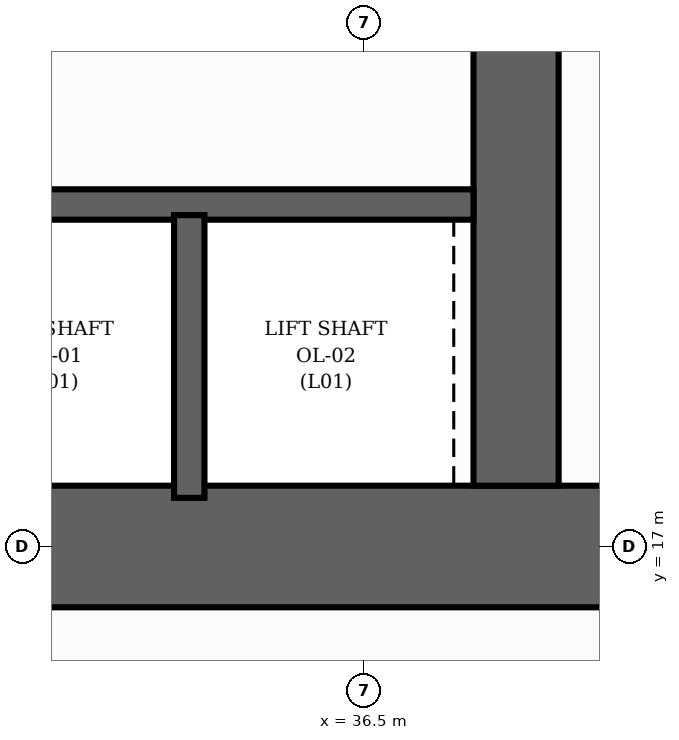
"""IFC4 building model, lengths in metres.
Left out: names, types, materials, properties, quantities, classifications, styles, units other than length and angle.
Written with IfcOpenShell. Run it as: python <this file> out.ifc"""

import sys

from ifc_helpers import new_model, si_unit, direction, frame, frame_2d, origin, place, context, subcontext, project, spatial, rectangle, extrude, element, save


model = new_model("IFC4")
c1 = context("Model", 3, precision=1e-05, world=origin(), true_north=direction((0.0, 1.0)))
c2 = subcontext(c1, "Body", "Model", "MODEL_VIEW")
j1 = project(units=[si_unit("LENGTHUNIT", "METRE"), si_unit("PLANEANGLEUNIT", "RADIAN")], contexts=[c1])
p1 = place(None, origin())
s1 = spatial("IfcSite", under=j1, at=p1, CompositionType="ELEMENT")
p2 = place(p1, origin())
s2 = spatial("IfcBuilding", under=s1, at=p2, CompositionType="ELEMENT")
p3 = place(p2, frame((0.0, 0.0, 4.0)))
s3 = spatial("IfcBuildingStorey", under=s2, at=p3, CompositionType="ELEMENT", Elevation=4.0)
p4 = place(p3, frame((22.6, 17.0, 0.0), z_axis=(0.0, 0.0, 1.0), x_axis=(1.0, 0.0, 0.0)))
e1 = element("IfcWall", 1, at=p4, inside=s3, PredefinedType="SHEAR", context=c2, shape_type="SweptSolid", body=[
    extrude(rectangle(XDim=18.8, YDim=0.8, at=frame_2d((9.4, 0.0))), origin(), (0.0, 0.0, 1.0), 4.0),
])
p5 = place(p4, frame((5.9, 0.0, 0.0)))
e2 = element("IfcOpeningElement", 2, at=p5, cuts=e1, PredefinedType="OPENING", context=c2, shape_type="SweptSolid", body=[
    extrude(rectangle(XDim=1.1, YDim=2.15, at=frame_2d((0.55, 1.075))), frame((0.0, 0.41, 0.0), z_axis=(0.0, -1.0, 0.0), x_axis=(1.0, 0.0, 0.0)), (0.0, 0.0, 1.0), 0.82),
])
p6 = place(p4, frame((9.45, 0.0, 0.0)))
e3 = element("IfcOpeningElement", 3, at=p6, cuts=e1, PredefinedType="OPENING", context=c2, shape_type="SweptSolid", body=[
    extrude(rectangle(XDim=0.9, YDim=2.1, at=frame_2d((0.45, 1.05))), frame((0.0, 0.41, 0.0), z_axis=(0.0, -1.0, 0.0), x_axis=(1.0, 0.0, 0.0)), (0.0, 0.0, 1.0), 0.82),
])
p7 = place(p3, frame((37.5, 17.4, 0.0), z_axis=(0.0, 0.0, 1.0), x_axis=(0.0, 1.0, 0.0)))
e4 = element("IfcWall", 4, at=p7, inside=s3, PredefinedType="SHEAR", context=c2, shape_type="SweptSolid", body=[
    extrude(rectangle(XDim=13.2, YDim=0.56, at=frame_2d((6.6, 0.0))), origin(), (0.0, 0.0, 1.0), 4.0),
])
p8 = place(p3, frame((33.5, 19.25, 0.0), z_axis=(0.0, 0.0, 1.0), x_axis=(1.0, 0.0, 0.0)))
e5 = element("IfcWall", 5, at=p8, inside=s3, PredefinedType="SHEAR", context=c2, shape_type="SweptSolid", body=[
    extrude(rectangle(XDim=3.72, YDim=0.2, at=frame_2d((1.86, 0.0))), origin(), (0.0, 0.0, 1.0), 4.0),
])
p9 = place(p3, frame((35.35, 17.32, 0.0), z_axis=(0.0, 0.0, 1.0), x_axis=(0.0, 1.0, 0.0)))
e6 = element("IfcWall", 6, at=p9, inside=s3, PredefinedType="SHEAR", context=c2, shape_type="SweptSolid", body=[
    extrude(rectangle(XDim=1.86, YDim=0.2, at=frame_2d((0.93, 0.0))), origin(), (0.0, 0.0, 1.0), 4.0),
])
save(model, sys.argv[1])
